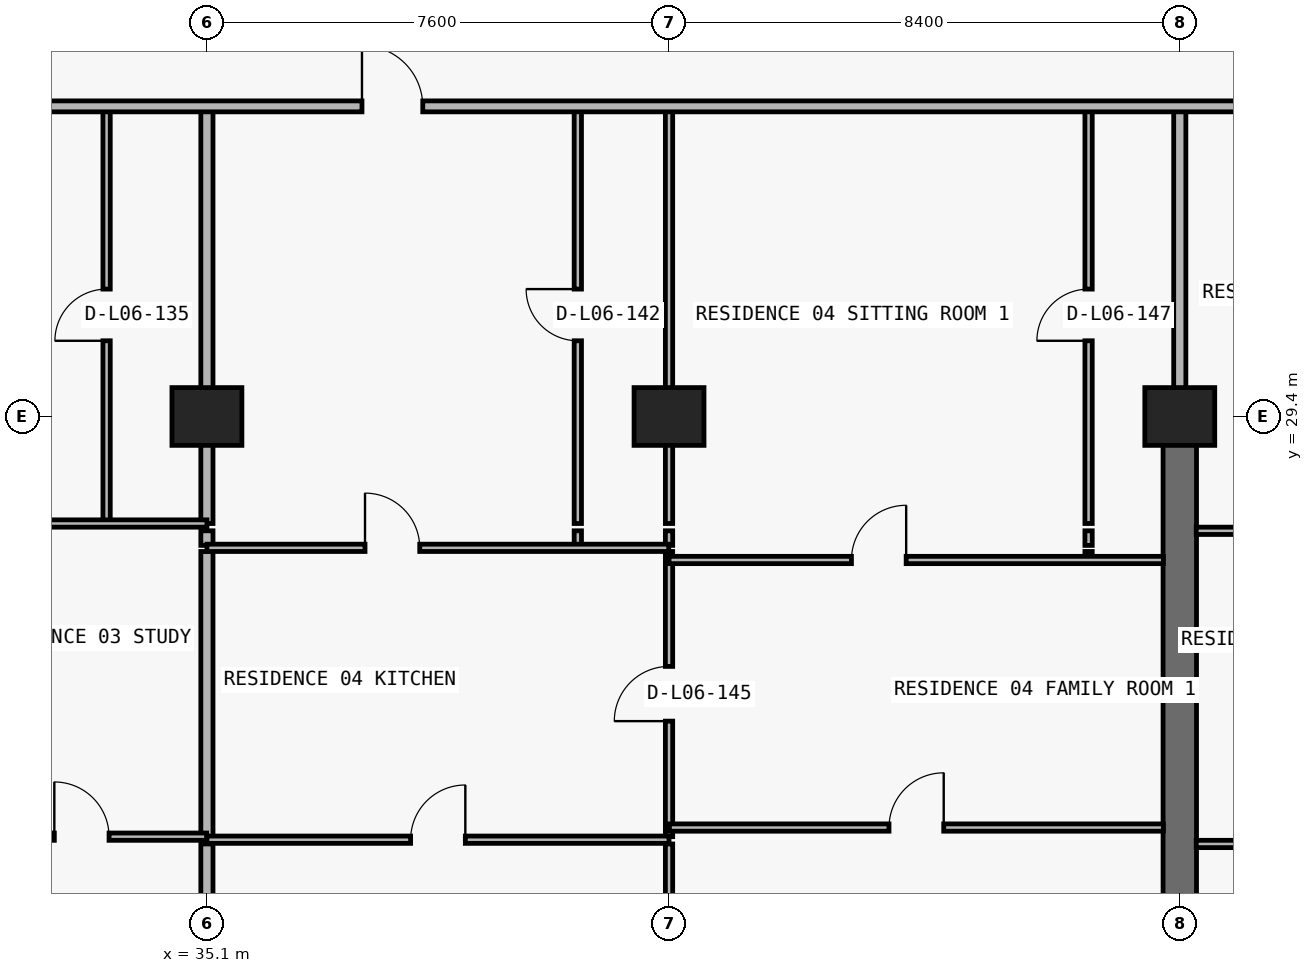
"""IFC4 building model, lengths in metres.
Left out: names, types, materials, properties, quantities, classifications, styles, units other than length and angle.
Written with IfcOpenShell. Run it as: python <this file> out.ifc"""

import sys

from ifc_helpers import new_model, si_unit, direction, frame, frame_2d, origin, origin_2d, place, context, subcontext, project, spatial, rectangle, extrude, element, fill, save


model = new_model("IFC4")
c1 = context("Model", 3, precision=1e-05, world=origin(), true_north=direction((0.0, 1.0)))
c2 = subcontext(c1, "Body", "Model", "MODEL_VIEW")
j1 = project(units=[si_unit("LENGTHUNIT", "METRE"), si_unit("PLANEANGLEUNIT", "RADIAN")], contexts=[c1])
p1 = place(None, origin())
s1 = spatial("IfcSite", under=j1, at=p1, CompositionType="ELEMENT")
p2 = place(p1, origin())
s2 = spatial("IfcBuilding", under=s1, at=p2, CompositionType="ELEMENT")
p3 = place(p2, frame((0.0, 0.0, 30.0)))
s3 = spatial("IfcBuildingStorey", under=s2, at=p3, CompositionType="ELEMENT", Elevation=30.0)
for number, where, z_axis, x_axis in (
    (1, (35.1, 29.4, 0.0), (0.0, 0.0, 1.0), (1.0, 0.0, 0.0)),
    (2, (42.7, 29.4, 0.0), (0.0, 0.0, 1.0), (1.0, 0.0, 0.0)),
    (3, (51.1, 29.4, 0.0), (0.0, 0.0, 1.0), (1.0, 0.0, 0.0)),
):
    element("IfcColumn", number, at=place(p3, frame(where, z_axis=z_axis, x_axis=x_axis)), inside=s3, PredefinedType="COLUMN", context=c2, shape_type="SweptSolid", body=[
        extrude(rectangle(XDim=1.15, YDim=0.95, at=origin_2d()), origin(), (0.0, 0.0, 1.0), 3.05),
    ])
p4 = place(p3, frame((51.1, 20.8, 0.0), z_axis=(0.0, 0.0, 1.0), x_axis=(0.0, 1.0, 0.0)))
e4 = element("IfcWall", 4, at=p4, inside=s3, PredefinedType="SHEAR", context=c2, shape_type="SweptSolid", body=[
    extrude(rectangle(XDim=8.6, YDim=0.55, at=frame_2d((4.3, 0.0))), origin(), (0.0, 0.0, 1.0), 3.05),
])
p5 = place(p3, frame((33.45, 27.64, 0.0), z_axis=(0.0, 0.0, 1.0), x_axis=(0.0, 1.0, 0.0)))
e5 = element("IfcWall", 5, at=p5, inside=s3, PredefinedType="PARTITIONING", context=c2, shape_type="SweptSolid", body=[
    extrude(rectangle(XDim=6.86, YDim=0.12, at=frame_2d((3.43, 0.0))), origin(), (0.0, 0.0, 1.0), 3.05),
])
p6 = place(p5, frame((3.005, 0.0, 0.0)))
e6 = element("IfcOpeningElement", 6, at=p6, cuts=e5, PredefinedType="OPENING", context=c2, shape_type="SweptSolid", body=[
    extrude(rectangle(XDim=0.85, YDim=2.1, at=frame_2d((0.425, 1.05))), frame((0.0, 0.07, 0.0), z_axis=(0.0, -1.0, 0.0), x_axis=(1.0, 0.0, 0.0)), (0.0, 0.0, 1.0), 0.14),
])
p7 = place(p3, frame((35.1, 6.24, 0.0), z_axis=(0.0, 0.0, 1.0), x_axis=(0.0, 1.0, 0.0)))
e7 = element("IfcWall", 7, at=p7, inside=s3, PredefinedType="PARTITIONING", context=c2, shape_type="SweptSolid", body=[
    extrude(rectangle(XDim=16.13, YDim=0.2, at=frame_2d((8.065, 0.0))), origin(), (0.0, 0.0, 1.0), 2.11),
])
p8 = place(p3, frame((35.1, 22.49, 0.0), z_axis=(0.0, 0.0, 1.0), x_axis=(0.0, 1.0, 0.0)))
e8 = element("IfcWall", 8, at=p8, inside=s3, PredefinedType="PARTITIONING", context=c2, shape_type="SweptSolid", body=[
    extrude(rectangle(XDim=4.69, YDim=0.2, at=frame_2d((2.345, 0.0))), origin(), (0.0, 0.0, 1.0), 2.11),
])
p9 = place(p3, frame((35.1, 27.28, 0.0), z_axis=(0.0, 0.0, 1.0), x_axis=(0.0, 1.0, 0.0)))
e9 = element("IfcWall", 9, at=p9, inside=s3, PredefinedType="PARTITIONING", context=c2, shape_type="SweptSolid", body=[
    extrude(rectangle(XDim=0.24, YDim=0.2, at=frame_2d((0.12, 0.0))), origin(), (0.0, 0.0, 1.0), 2.11),
])
p10 = place(p3, frame((35.1, 27.64, 0.0), z_axis=(0.0, 0.0, 1.0), x_axis=(0.0, 1.0, 0.0)))
e10 = element("IfcWall", 10, at=p10, inside=s3, PredefinedType="PARTITIONING", context=c2, shape_type="SweptSolid", body=[
    extrude(rectangle(XDim=6.86, YDim=0.2, at=frame_2d((3.43, 0.0))), origin(), (0.0, 0.0, 1.0), 2.11),
])
p11 = place(p3, frame((41.2, 27.28, 0.0), z_axis=(0.0, 0.0, 1.0), x_axis=(0.0, 1.0, 0.0)))
e11 = element("IfcWall", 11, at=p11, inside=s3, PredefinedType="PARTITIONING", context=c2, shape_type="SweptSolid", body=[
    extrude(rectangle(XDim=0.24, YDim=0.12, at=frame_2d((0.12, 0.0))), origin(), (0.0, 0.0, 1.0), 3.05),
])
p12 = place(p3, frame((41.2, 27.64, 0.0), z_axis=(0.0, 0.0, 1.0), x_axis=(0.0, 1.0, 0.0)))
e12 = element("IfcWall", 12, at=p12, inside=s3, PredefinedType="PARTITIONING", context=c2, shape_type="SweptSolid", body=[
    extrude(rectangle(XDim=6.86, YDim=0.12, at=frame_2d((3.43, 0.0))), origin(), (0.0, 0.0, 1.0), 3.05),
])
p13 = place(p12, frame((3.005, 0.0, 0.0)))
e13 = element("IfcOpeningElement", 13, at=p13, cuts=e12, PredefinedType="OPENING", context=c2, shape_type="SweptSolid", body=[
    extrude(rectangle(XDim=0.85, YDim=2.1, at=frame_2d((0.425, 1.05))), frame((0.0, 0.07, 0.0), z_axis=(0.0, -1.0, 0.0), x_axis=(1.0, 0.0, 0.0)), (0.0, 0.0, 1.0), 0.14),
])
p14 = place(p3, frame((42.7, 6.24, 0.0), z_axis=(0.0, 0.0, 1.0), x_axis=(0.0, 1.0, 0.0)))
e14 = element("IfcWall", 14, at=p14, inside=s3, PredefinedType="PARTITIONING", context=c2, shape_type="SweptSolid", body=[
    extrude(rectangle(XDim=16.13, YDim=0.12, at=frame_2d((8.065, 0.0))), origin(), (0.0, 0.0, 1.0), 2.11),
])
p15 = place(p3, frame((42.7, 22.49, 0.0), z_axis=(0.0, 0.0, 1.0), x_axis=(0.0, 1.0, 0.0)))
e15 = element("IfcWall", 15, at=p15, inside=s3, PredefinedType="PARTITIONING", context=c2, shape_type="SweptSolid", body=[
    extrude(rectangle(XDim=4.69, YDim=0.12, at=frame_2d((2.345, 0.0))), origin(), (0.0, 0.0, 1.0), 2.11),
])
p16 = place(p15, frame((1.9, 0.0, 0.0)))
e16 = element("IfcOpeningElement", 16, at=p16, cuts=e15, PredefinedType="OPENING", context=c2, shape_type="SweptSolid", body=[
    extrude(rectangle(XDim=0.9, YDim=2.06, at=frame_2d((0.45, 1.03))), frame((0.0, 0.07, 0.0), z_axis=(0.0, -1.0, 0.0), x_axis=(1.0, 0.0, 0.0)), (0.0, 0.0, 1.0), 0.14),
])
p17 = place(p3, frame((42.7, 27.28, 0.0), z_axis=(0.0, 0.0, 1.0), x_axis=(0.0, 1.0, 0.0)))
e17 = element("IfcWall", 17, at=p17, inside=s3, PredefinedType="PARTITIONING", context=c2, shape_type="SweptSolid", body=[
    extrude(rectangle(XDim=0.24, YDim=0.12, at=frame_2d((0.12, 0.0))), origin(), (0.0, 0.0, 1.0), 2.11),
])
p18 = place(p3, frame((42.7, 27.64, 0.0), z_axis=(0.0, 0.0, 1.0), x_axis=(0.0, 1.0, 0.0)))
e18 = element("IfcWall", 18, at=p18, inside=s3, PredefinedType="PARTITIONING", context=c2, shape_type="SweptSolid", body=[
    extrude(rectangle(XDim=6.86, YDim=0.12, at=frame_2d((3.43, 0.0))), origin(), (0.0, 0.0, 1.0), 2.11),
])
p19 = place(p3, frame((49.6, 27.04, 0.0), z_axis=(0.0, 0.0, 1.0), x_axis=(0.0, 1.0, 0.0)))
e19 = element("IfcWall", 19, at=p19, inside=s3, PredefinedType="PARTITIONING", context=c2, shape_type="SweptSolid", body=[
    extrude(rectangle(XDim=0.14, YDim=0.12, at=frame_2d((0.07, 0.0))), origin(), (0.0, 0.0, 1.0), 3.05),
])
p20 = place(p3, frame((49.6, 27.28, 0.0), z_axis=(0.0, 0.0, 1.0), x_axis=(0.0, 1.0, 0.0)))
e20 = element("IfcWall", 20, at=p20, inside=s3, PredefinedType="PARTITIONING", context=c2, shape_type="SweptSolid", body=[
    extrude(rectangle(XDim=0.24, YDim=0.12, at=frame_2d((0.12, 0.0))), origin(), (0.0, 0.0, 1.0), 3.05),
])
p21 = place(p3, frame((49.6, 27.64, 0.0), z_axis=(0.0, 0.0, 1.0), x_axis=(0.0, 1.0, 0.0)))
e21 = element("IfcWall", 21, at=p21, inside=s3, PredefinedType="PARTITIONING", context=c2, shape_type="SweptSolid", body=[
    extrude(rectangle(XDim=6.86, YDim=0.12, at=frame_2d((3.43, 0.0))), origin(), (0.0, 0.0, 1.0), 3.05),
])
p22 = place(p21, frame((3.005, 0.0, 0.0)))
e22 = element("IfcOpeningElement", 22, at=p22, cuts=e21, PredefinedType="OPENING", context=c2, shape_type="SweptSolid", body=[
    extrude(rectangle(XDim=0.85, YDim=2.1, at=frame_2d((0.425, 1.05))), frame((0.0, 0.07, 0.0), z_axis=(0.0, -1.0, 0.0), x_axis=(1.0, 0.0, 0.0)), (0.0, 0.0, 1.0), 0.14),
])
p23 = place(p3, frame((51.1, 29.405, 0.0), z_axis=(0.0, 0.0, 1.0), x_axis=(0.0, 1.0, 0.0)))
e23 = element("IfcWall", 23, at=p23, inside=s3, PredefinedType="PARTITIONING", context=c2, shape_type="SweptSolid", body=[
    extrude(rectangle(XDim=5.095, YDim=0.2, at=frame_2d((2.547, 0.0))), origin(), (0.0, 0.0, 1.0), 2.335),
])
p24 = place(p3, frame((51.37, 22.37, 0.0), z_axis=(0.0, 0.0, 1.0), x_axis=(1.0, 0.0, 0.0)))
e24 = element("IfcWall", 24, at=p24, inside=s3, PredefinedType="PARTITIONING", context=c2, shape_type="SweptSolid", body=[
    extrude(rectangle(XDim=4.516, YDim=0.12, at=frame_2d((2.258, 0.0))), origin(), (0.0, 0.0, 1.0), 3.05),
])
p25 = place(p24, frame((1.389, 0.0, 0.0)))
e25 = element("IfcOpeningElement", 25, at=p25, cuts=e24, PredefinedType="OPENING", context=c2, shape_type="SweptSolid", body=[
    extrude(rectangle(XDim=0.9, YDim=2.15, at=frame_2d((0.45, 1.075))), frame((0.0, 0.07, 0.0), z_axis=(0.0, -1.0, 0.0), x_axis=(1.0, 0.0, 0.0)), (0.0, 0.0, 1.0), 0.14),
])
p26 = place(p3, frame((35.1, 22.44, 0.0), z_axis=(0.0, 0.0, 1.0), x_axis=(1.0, 0.0, 0.0)))
e26 = element("IfcWall", 26, at=p26, inside=s3, PredefinedType="PARTITIONING", context=c2, shape_type="SweptSolid", body=[
    extrude(rectangle(XDim=7.6, YDim=0.12, at=frame_2d((3.8, 0.0))), origin(), (0.0, 0.0, 1.0), 3.05),
])
p27 = place(p26, frame((3.35, 0.0, 0.0)))
e27 = element("IfcOpeningElement", 27, at=p27, cuts=e26, PredefinedType="OPENING", context=c2, shape_type="SweptSolid", body=[
    extrude(rectangle(XDim=0.9, YDim=2.15, at=frame_2d((0.45, 1.075))), frame((0.0, 0.07, 0.0), z_axis=(0.0, -1.0, 0.0), x_axis=(1.0, 0.0, 0.0)), (0.0, 0.0, 1.0), 0.14),
])
p28 = place(p3, frame((26.97, 22.49, 0.0), z_axis=(0.0, 0.0, 1.0), x_axis=(1.0, 0.0, 0.0)))
e28 = element("IfcWall", 28, at=p28, inside=s3, PredefinedType="PARTITIONING", context=c2, shape_type="SweptSolid", body=[
    extrude(rectangle(XDim=8.125, YDim=0.12, at=frame_2d((4.062, 0.0))), origin(), (0.0, 0.0, 1.0), 3.05),
])
p29 = place(p28, frame((1.389, 0.0, 0.0)))
e29 = element("IfcOpeningElement", 29, at=p29, cuts=e28, PredefinedType="OPENING", context=c2, shape_type="SweptSolid", body=[
    extrude(rectangle(XDim=0.9, YDim=2.15, at=frame_2d((0.45, 1.075))), frame((0.0, 0.07, 0.0), z_axis=(0.0, -1.0, 0.0), x_axis=(1.0, 0.0, 0.0)), (0.0, 0.0, 1.0), 0.14),
])
p30 = place(p28, frame((5.621, 0.0, 0.0)))
e30 = element("IfcOpeningElement", 30, at=p30, cuts=e28, PredefinedType="OPENING", context=c2, shape_type="SweptSolid", body=[
    extrude(rectangle(XDim=0.9, YDim=2.15, at=frame_2d((0.45, 1.075))), frame((0.0, 0.07, 0.0), z_axis=(0.0, -1.0, 0.0), x_axis=(1.0, 0.0, 0.0)), (0.0, 0.0, 1.0), 0.14),
])
p31 = place(p3, frame((42.705, 22.64, 0.0), z_axis=(0.0, 0.0, 1.0), x_axis=(1.0, 0.0, 0.0)))
e31 = element("IfcWall", 31, at=p31, inside=s3, PredefinedType="PARTITIONING", context=c2, shape_type="SweptSolid", body=[
    extrude(rectangle(XDim=8.125, YDim=0.12, at=frame_2d((4.062, 0.0))), origin(), (0.0, 0.0, 1.0), 3.05),
])
p32 = place(p31, frame((3.613, 0.0, 0.0)))
e32 = element("IfcOpeningElement", 32, at=p32, cuts=e31, PredefinedType="OPENING", context=c2, shape_type="SweptSolid", body=[
    extrude(rectangle(XDim=0.9, YDim=2.15, at=frame_2d((0.45, 1.075))), frame((0.0, 0.07, 0.0), z_axis=(0.0, -1.0, 0.0), x_axis=(1.0, 0.0, 0.0)), (0.0, 0.0, 1.0), 0.14),
])
p33 = place(p3, frame((42.7, 27.04, 0.0), z_axis=(0.0, 0.0, 1.0), x_axis=(1.0, 0.0, 0.0)))
e33 = element("IfcWall", 33, at=p33, inside=s3, PredefinedType="PARTITIONING", context=c2, shape_type="SweptSolid", body=[
    extrude(rectangle(XDim=8.13, YDim=0.12, at=frame_2d((4.065, 0.0))), origin(), (0.0, 0.0, 1.0), 3.05),
])
p34 = place(p33, frame((3.0, 0.0, 0.0)))
e34 = element("IfcOpeningElement", 34, at=p34, cuts=e33, PredefinedType="OPENING", context=c2, shape_type="SweptSolid", body=[
    extrude(rectangle(XDim=0.9, YDim=2.15, at=frame_2d((0.45, 1.075))), frame((0.0, 0.07, 0.0), z_axis=(0.0, -1.0, 0.0), x_axis=(1.0, 0.0, 0.0)), (0.0, 0.0, 1.0), 0.14),
])
p35 = place(p3, frame((35.1, 27.24, 0.0), z_axis=(0.0, 0.0, 1.0), x_axis=(1.0, 0.0, 0.0)))
e35 = element("IfcWall", 35, at=p35, inside=s3, PredefinedType="PARTITIONING", context=c2, shape_type="SweptSolid", body=[
    extrude(rectangle(XDim=7.595, YDim=0.12, at=frame_2d((3.797, 0.0))), origin(), (0.0, 0.0, 1.0), 3.05),
])
p36 = place(p35, frame((2.6, 0.0, 0.0)))
e36 = element("IfcOpeningElement", 36, at=p36, cuts=e35, PredefinedType="OPENING", context=c2, shape_type="SweptSolid", body=[
    extrude(rectangle(XDim=0.9, YDim=2.15, at=frame_2d((0.45, 1.075))), frame((0.0, 0.07, 0.0), z_axis=(0.0, -1.0, 0.0), x_axis=(1.0, 0.0, 0.0)), (0.0, 0.0, 1.0), 0.14),
])
p37 = place(p3, frame((51.37, 27.52, 0.0), z_axis=(0.0, 0.0, 1.0), x_axis=(1.0, 0.0, 0.0)))
e37 = element("IfcWall", 37, at=p37, inside=s3, PredefinedType="PARTITIONING", context=c2, shape_type="SweptSolid", body=[
    extrude(rectangle(XDim=4.516, YDim=0.12, at=frame_2d((2.258, 0.0))), origin(), (0.0, 0.0, 1.0), 3.05),
])
p38 = place(p37, frame((1.808, 0.0, 0.0)))
e38 = element("IfcOpeningElement", 38, at=p38, cuts=e37, PredefinedType="OPENING", context=c2, shape_type="SweptSolid", body=[
    extrude(rectangle(XDim=0.9, YDim=2.15, at=frame_2d((0.45, 1.075))), frame((0.0, 0.07, 0.0), z_axis=(0.0, -1.0, 0.0), x_axis=(1.0, 0.0, 0.0)), (0.0, 0.0, 1.0), 0.14),
])
p39 = place(p3, frame((26.97, 27.64, 0.0), z_axis=(0.0, 0.0, 1.0), x_axis=(1.0, 0.0, 0.0)))
e39 = element("IfcWall", 39, at=p39, inside=s3, PredefinedType="PARTITIONING", context=c2, shape_type="SweptSolid", body=[
    extrude(rectangle(XDim=8.13, YDim=0.12, at=frame_2d((4.065, 0.0))), origin(), (0.0, 0.0, 1.0), 3.05),
])
p40 = place(p39, frame((1.558, 0.0, 0.0)))
e40 = element("IfcOpeningElement", 40, at=p40, cuts=e39, PredefinedType="OPENING", context=c2, shape_type="SweptSolid", body=[
    extrude(rectangle(XDim=0.9, YDim=2.15, at=frame_2d((0.45, 1.075))), frame((0.0, 0.07, 0.0), z_axis=(0.0, -1.0, 0.0), x_axis=(1.0, 0.0, 0.0)), (0.0, 0.0, 1.0), 0.14),
])
p41 = place(p3, frame((5.105, 34.5, 0.0), z_axis=(0.0, 0.0, 1.0), x_axis=(1.0, 0.0, 0.0)))
e41 = element("IfcWall", 41, at=p41, inside=s3, PredefinedType="PARTITIONING", context=c2, shape_type="SweptSolid", body=[
    extrude(rectangle(XDim=50.781, YDim=0.18, at=frame_2d((25.391, 0.0))), origin(), (0.0, 0.0, 1.0), 3.05),
])
p42 = place(p41, frame((7.67, 0.0, 0.0)))
e42 = element("IfcOpeningElement", 42, at=p42, cuts=e41, PredefinedType="OPENING", context=c2, shape_type="SweptSolid", body=[
    extrude(rectangle(XDim=1.0, YDim=2.2, at=frame_2d((0.5, 1.1))), frame((0.0, 0.1, 0.0), z_axis=(0.0, -1.0, 0.0), x_axis=(1.0, 0.0, 0.0)), (0.0, 0.0, 1.0), 0.2),
])
p43 = place(p41, frame((16.07, 0.0, 0.0)))
e43 = element("IfcOpeningElement", 43, at=p43, cuts=e41, PredefinedType="OPENING", context=c2, shape_type="SweptSolid", body=[
    extrude(rectangle(XDim=1.0, YDim=2.2, at=frame_2d((0.5, 1.1))), frame((0.0, 0.1, 0.0), z_axis=(0.0, -1.0, 0.0), x_axis=(1.0, 0.0, 0.0)), (0.0, 0.0, 1.0), 0.2),
])
p44 = place(p41, frame((24.47, 0.0, 0.0)))
e44 = element("IfcOpeningElement", 44, at=p44, cuts=e41, PredefinedType="OPENING", context=c2, shape_type="SweptSolid", body=[
    extrude(rectangle(XDim=1.0, YDim=2.2, at=frame_2d((0.5, 1.1))), frame((0.0, 0.1, 0.0), z_axis=(0.0, -1.0, 0.0), x_axis=(1.0, 0.0, 0.0)), (0.0, 0.0, 1.0), 0.2),
])
p45 = place(p41, frame((32.545, 0.0, 0.0)))
e45 = element("IfcOpeningElement", 45, at=p45, cuts=e41, PredefinedType="OPENING", context=c2, shape_type="SweptSolid", body=[
    extrude(rectangle(XDim=1.0, YDim=2.2, at=frame_2d((0.5, 1.1))), frame((0.0, 0.1, 0.0), z_axis=(0.0, -1.0, 0.0), x_axis=(1.0, 0.0, 0.0)), (0.0, 0.0, 1.0), 0.2),
])
p46 = place(p41, frame((47.888, 0.0, 0.0)))
e46 = element("IfcOpeningElement", 46, at=p46, cuts=e41, PredefinedType="OPENING", context=c2, shape_type="SweptSolid", body=[
    extrude(rectangle(XDim=1.0, YDim=2.2, at=frame_2d((0.5, 1.1))), frame((0.0, 0.1, 0.0), z_axis=(0.0, -1.0, 0.0), x_axis=(1.0, 0.0, 0.0)), (0.0, 0.0, 1.0), 0.2),
])
p47 = place(p6, origin())
e47 = element("IfcDoor", 47, at=p47, inside=s3, OperationType="SINGLE_SWING_LEFT", PredefinedType="DOOR", context=c2, shape_type="SweptSolid", body=[
    extrude(rectangle(XDim=0.85, YDim=2.1, at=frame_2d((0.425, 1.05))), frame((0.0, 0.025, 0.0), z_axis=(0.0, -1.0, 0.0), x_axis=(1.0, 0.0, 0.0)), (0.0, 0.0, 1.0), 0.05),
])
fill(e6, e47)
p48 = place(p30, origin())
e48 = element("IfcDoor", 48, at=p48, inside=s3, OperationType="SINGLE_SWING_LEFT", PredefinedType="DOOR", context=c2, shape_type="SweptSolid", body=[
    extrude(rectangle(XDim=0.9, YDim=2.15, at=frame_2d((0.45, 1.075))), frame((0.0, 0.025, 0.0), z_axis=(0.0, -1.0, 0.0), x_axis=(1.0, 0.0, 0.0)), (0.0, 0.0, 1.0), 0.05),
])
fill(e30, e48)
p49 = place(p45, origin())
e49 = element("IfcDoor", 49, at=p49, inside=s3, OperationType="SINGLE_SWING_LEFT", PredefinedType="DOOR", context=c2, shape_type="SweptSolid", body=[
    extrude(rectangle(XDim=1.0, YDim=2.2, at=frame_2d((0.5, 1.1))), frame((0.0, 0.025, 0.0), z_axis=(0.0, -1.0, 0.0), x_axis=(1.0, 0.0, 0.0)), (0.0, 0.0, 1.0), 0.05),
])
fill(e45, e49)
p50 = place(p13, origin())
e50 = element("IfcDoor", 50, at=p50, inside=s3, OperationType="SINGLE_SWING_RIGHT", PredefinedType="DOOR", context=c2, shape_type="SweptSolid", body=[
    extrude(rectangle(XDim=0.85, YDim=2.1, at=frame_2d((0.425, 1.05))), frame((0.0, 0.025, 0.0), z_axis=(0.0, -1.0, 0.0), x_axis=(1.0, 0.0, 0.0)), (0.0, 0.0, 1.0), 0.05),
])
fill(e13, e50)
p51 = place(p36, origin())
e51 = element("IfcDoor", 51, at=p51, inside=s3, OperationType="SINGLE_SWING_LEFT", PredefinedType="DOOR", context=c2, shape_type="SweptSolid", body=[
    extrude(rectangle(XDim=0.9, YDim=2.15, at=frame_2d((0.45, 1.075))), frame((0.0, 0.025, 0.0), z_axis=(0.0, -1.0, 0.0), x_axis=(1.0, 0.0, 0.0)), (0.0, 0.0, 1.0), 0.05),
])
fill(e36, e51)
p52 = place(p27, origin())
e52 = element("IfcDoor", 52, at=p52, inside=s3, OperationType="SINGLE_SWING_RIGHT", PredefinedType="DOOR", context=c2, shape_type="SweptSolid", body=[
    extrude(rectangle(XDim=0.9, YDim=2.15, at=frame_2d((0.45, 1.075))), frame((0.0, 0.025, 0.0), z_axis=(0.0, -1.0, 0.0), x_axis=(1.0, 0.0, 0.0)), (0.0, 0.0, 1.0), 0.05),
])
fill(e27, e52)
p53 = place(p16, origin())
e53 = element("IfcDoor", 53, at=p53, inside=s3, OperationType="SINGLE_SWING_LEFT", PredefinedType="DOOR", context=c2, shape_type="SweptSolid", body=[
    extrude(rectangle(XDim=0.9, YDim=2.06, at=frame_2d((0.45, 1.03))), frame((0.0, 0.025, 0.0), z_axis=(0.0, -1.0, 0.0), x_axis=(1.0, 0.0, 0.0)), (0.0, 0.0, 1.0), 0.05),
])
fill(e16, e53)
p54 = place(p34, origin())
e54 = element("IfcDoor", 54, at=p54, inside=s3, OperationType="SINGLE_SWING_RIGHT", PredefinedType="DOOR", context=c2, shape_type="SweptSolid", body=[
    extrude(rectangle(XDim=0.9, YDim=2.15, at=frame_2d((0.45, 1.075))), frame((0.0, 0.025, 0.0), z_axis=(0.0, -1.0, 0.0), x_axis=(1.0, 0.0, 0.0)), (0.0, 0.0, 1.0), 0.05),
])
fill(e34, e54)
p55 = place(p22, origin())
e55 = element("IfcDoor", 55, at=p55, inside=s3, OperationType="SINGLE_SWING_LEFT", PredefinedType="DOOR", context=c2, shape_type="SweptSolid", body=[
    extrude(rectangle(XDim=0.85, YDim=2.1, at=frame_2d((0.425, 1.05))), frame((0.0, 0.025, 0.0), z_axis=(0.0, -1.0, 0.0), x_axis=(1.0, 0.0, 0.0)), (0.0, 0.0, 1.0), 0.05),
])
fill(e22, e55)
p56 = place(p32, origin())
e56 = element("IfcDoor", 56, at=p56, inside=s3, OperationType="SINGLE_SWING_RIGHT", PredefinedType="DOOR", context=c2, shape_type="SweptSolid", body=[
    extrude(rectangle(XDim=0.9, YDim=2.15, at=frame_2d((0.45, 1.075))), frame((0.0, 0.025, 0.0), z_axis=(0.0, -1.0, 0.0), x_axis=(1.0, 0.0, 0.0)), (0.0, 0.0, 1.0), 0.05),
])
fill(e32, e56)
save(model, sys.argv[1])
